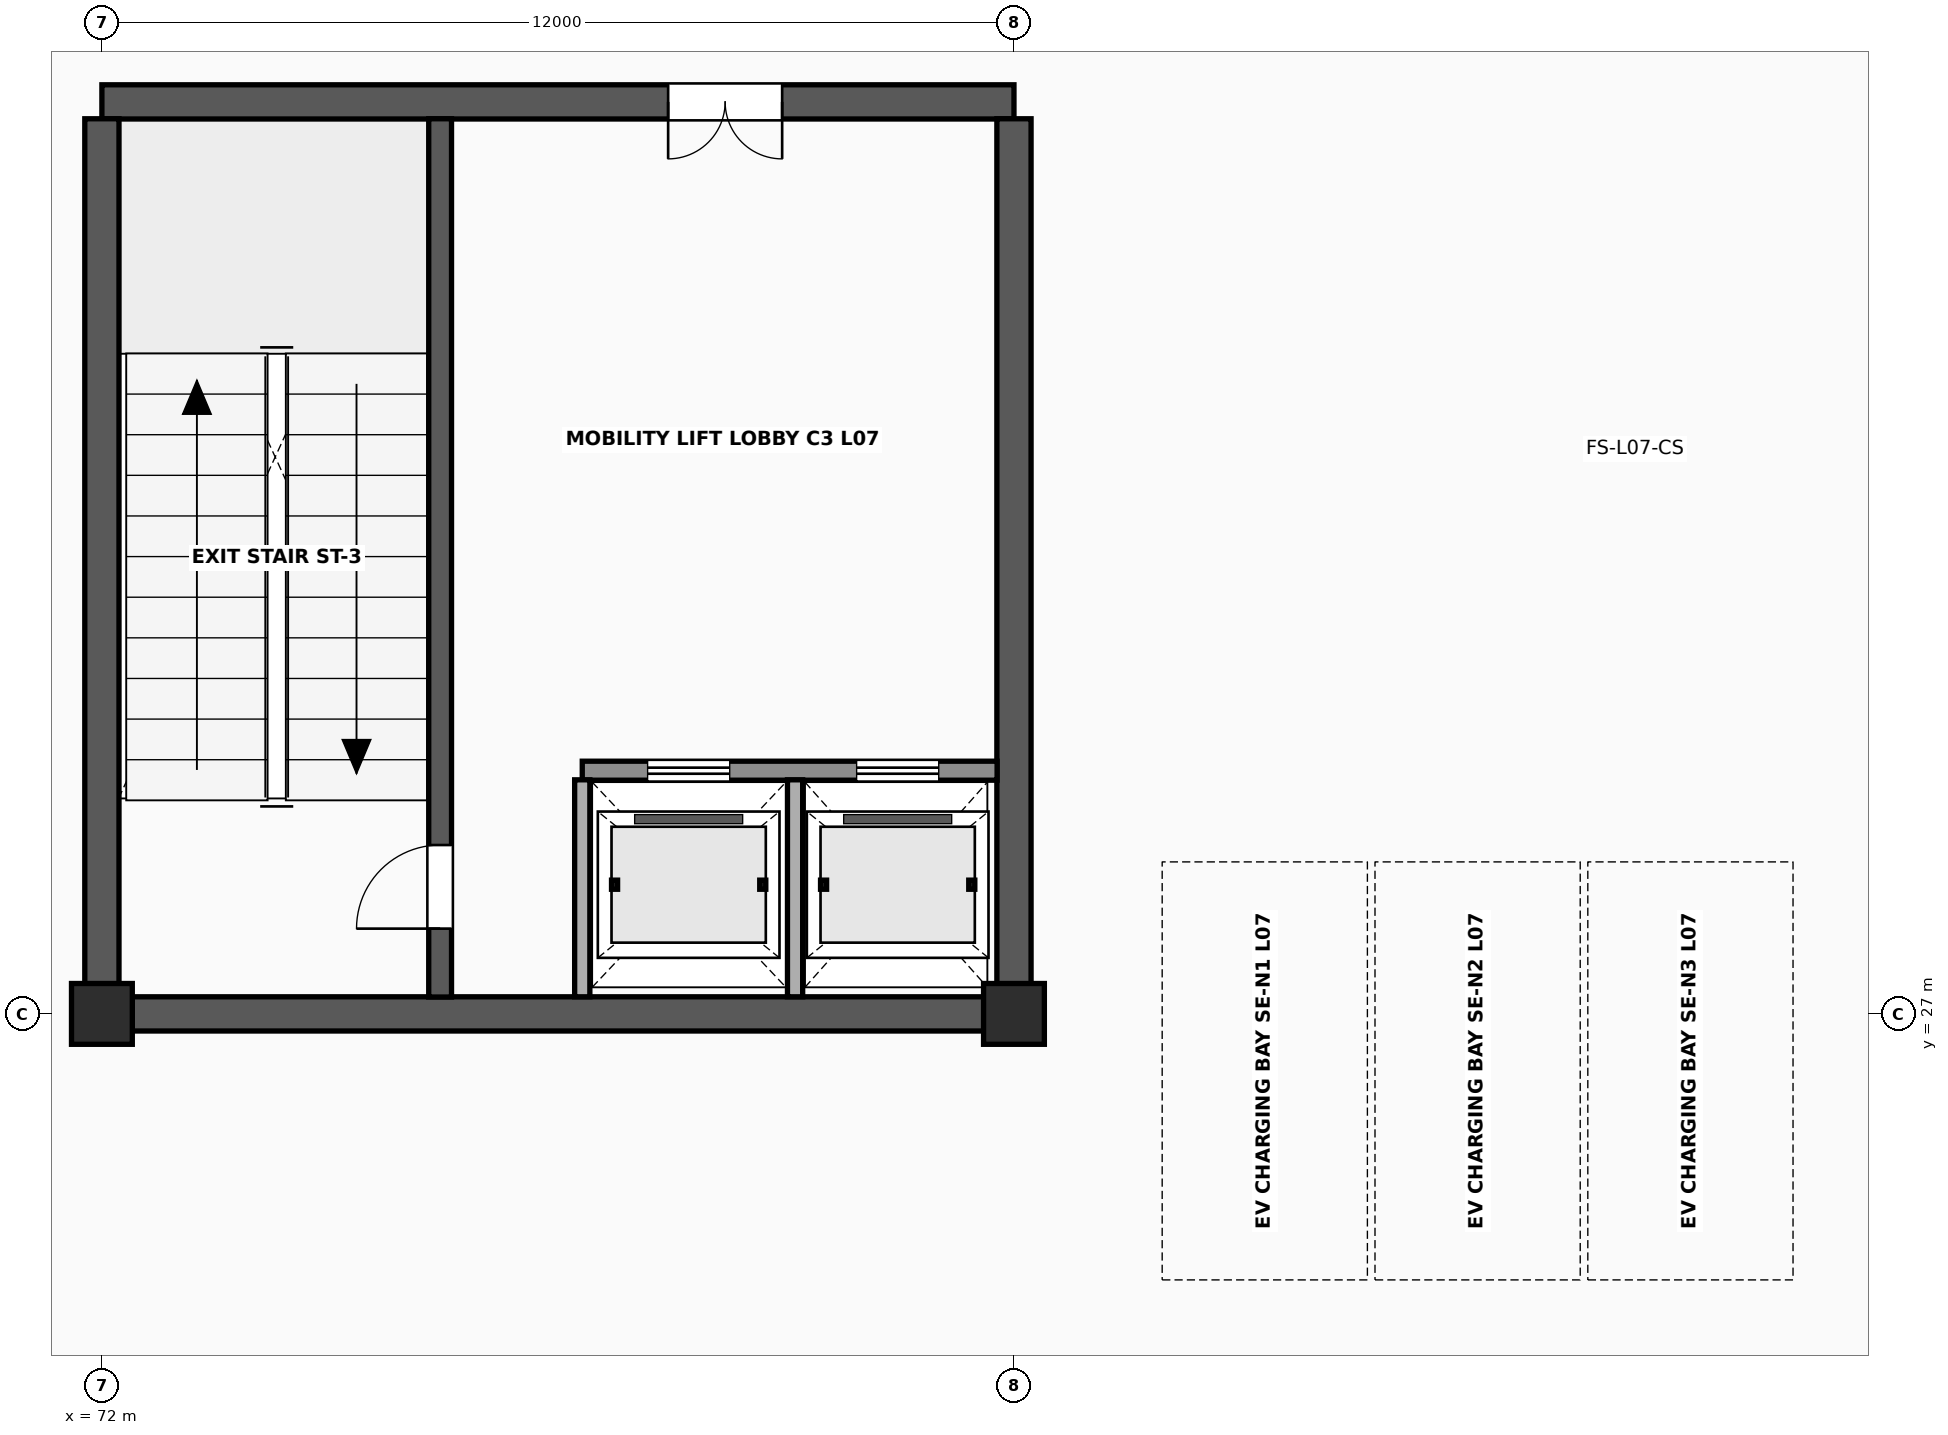
"""IFC4 building model, lengths in metres.
Left out: names, types, materials, properties, quantities, classifications, styles, units other than length and angle.
Written with IfcOpenShell. Run it as: python <this file> out.ifc"""

import sys

from ifc_helpers import new_model, si_unit, direction, frame, frame_2d, origin, origin_2d, place, context, subcontext, project, spatial, rectangle, extrude, element, fill, save


model = new_model("IFC4")
c1 = context("Model", 3, precision=1e-05, world=origin(), true_north=direction((0.0, 1.0)))
c2 = subcontext(c1, "Body", "Model", "MODEL_VIEW")
j1 = project(units=[si_unit("LENGTHUNIT", "METRE"), si_unit("PLANEANGLEUNIT", "RADIAN")], contexts=[c1])
p1 = place(None, origin())
s1 = spatial("IfcSite", under=j1, at=p1, CompositionType="ELEMENT")
p2 = place(p1, origin())
s2 = spatial("IfcBuilding", under=s1, at=p2, CompositionType="ELEMENT")
p3 = place(p2, frame((0.0, 0.0, 28.6)))
s3 = spatial("IfcBuildingStorey", under=s2, at=p3, CompositionType="ELEMENT", Elevation=28.6)
for number, where, z_axis, x_axis in (
    (1, (72.0, 27.0, 0.0), (0.0, 0.0, 1.0), (1.0, 0.0, 0.0)),
    (2, (84.0, 27.0, 0.0), (0.0, 0.0, 1.0), (1.0, 0.0, 0.0)),
):
    element("IfcColumn", number, at=place(p3, frame(where, z_axis=z_axis, x_axis=x_axis)), inside=s3, PredefinedType="COLUMN", context=c2, shape_type="SweptSolid", body=[
        extrude(rectangle(XDim=0.8, YDim=0.8, at=origin_2d()), origin(), (0.0, 0.0, 1.0), 3.8),
    ])
p4 = place(p3, frame((72.397, 27.0, 0.0), z_axis=(0.0, 0.0, 1.0), x_axis=(1.0, 0.0, 0.0)))
e3 = element("IfcWall", 3, at=p4, inside=s3, PredefinedType="SHEAR", context=c2, shape_type="SweptSolid", body=[
    extrude(rectangle(XDim=11.206, YDim=0.45, at=frame_2d((5.603, 0.0))), origin(), (0.0, 0.0, 1.0), 3.553),
])
p5 = place(p3, frame((72.0, 39.0, 0.0), z_axis=(0.0, 0.0, 1.0), x_axis=(1.0, 0.0, 0.0)))
e4 = element("IfcWall", 4, at=p5, inside=s3, PredefinedType="SHEAR", context=c2, shape_type="SweptSolid", body=[
    extrude(rectangle(XDim=12.0, YDim=0.45, at=frame_2d((6.0, 0.0))), origin(), (0.0, 0.0, 1.0), 3.553),
])
p6 = place(p5, frame((7.45, 0.0, 0.0)))
e5 = element("IfcOpeningElement", 5, at=p6, cuts=e4, PredefinedType="OPENING", context=c2, shape_type="SweptSolid", body=[
    extrude(rectangle(XDim=1.5, YDim=2.25, at=frame_2d((0.75, 1.125))), frame((0.0, 0.24, 0.0), z_axis=(0.0, -1.0, 0.0), x_axis=(1.0, 0.0, 0.0)), (0.0, 0.0, 1.0), 0.48),
])
for number, where, z_axis, x_axis in (
    (6, (72.0, 27.397, 0.0), (0.0, 0.0, 1.0), (0.0, 1.0, 0.0)),
    (7, (84.0, 27.397, 0.0), (0.0, 0.0, 1.0), (0.0, 1.0, 0.0)),
):
    element("IfcWall", number, at=place(p3, frame(where, z_axis=z_axis, x_axis=x_axis)), inside=s3, PredefinedType="SHEAR", context=c2, shape_type="SweptSolid", body=[
        extrude(rectangle(XDim=11.381, YDim=0.45, at=frame_2d((5.69, 0.0))), origin(), (0.0, 0.0, 1.0), 3.553),
    ])
p7 = place(p3, frame((76.45, 27.222, 0.0), z_axis=(0.0, 0.0, 1.0), x_axis=(0.0, 1.0, 0.0)))
e8 = element("IfcWall", 8, at=p7, inside=s3, PredefinedType="SHEAR", context=c2, shape_type="SweptSolid", body=[
    extrude(rectangle(XDim=11.556, YDim=0.3, at=frame_2d((5.778, 0.0))), origin(), (0.0, 0.0, 1.0), 3.553),
])
p8 = place(p7, frame((0.9, 0.0, 0.0)))
e9 = element("IfcOpeningElement", 9, at=p8, cuts=e8, PredefinedType="OPENING", context=c2, shape_type="SweptSolid", body=[
    extrude(rectangle(XDim=1.1, YDim=2.2, at=frame_2d((0.55, 1.1))), frame((0.0, 0.165, 0.0), z_axis=(0.0, -1.0, 0.0), x_axis=(1.0, 0.0, 0.0)), (0.0, 0.0, 1.0), 0.33),
])
p9 = place(p3, frame((78.32, 30.2, 0.0), z_axis=(0.0, 0.0, 1.0), x_axis=(1.0, 0.0, 0.0)))
e10 = element("IfcWall", 10, at=p9, inside=s3, PredefinedType="SOLIDWALL", context=c2, shape_type="SweptSolid", body=[
    extrude(rectangle(XDim=5.458, YDim=0.25, at=frame_2d((2.729, 0.0))), origin(), (0.0, 0.0, 1.0), 3.553),
])
p10 = place(p9, frame((0.86, 0.0, 0.0)))
e11 = element("IfcOpeningElement", 11, at=p10, cuts=e10, PredefinedType="OPENING", context=c2, shape_type="SweptSolid", body=[
    extrude(rectangle(XDim=1.08, YDim=2.22, at=frame_2d((0.54, 1.11))), frame((0.0, 0.14, 0.0), z_axis=(0.0, -1.0, 0.0), x_axis=(1.0, 0.0, 0.0)), (0.0, 0.0, 1.0), 0.28),
])
p11 = place(p9, frame((3.61, 0.0, 0.0)))
e12 = element("IfcOpeningElement", 12, at=p11, cuts=e10, PredefinedType="OPENING", context=c2, shape_type="SweptSolid", body=[
    extrude(rectangle(XDim=1.08, YDim=2.22, at=frame_2d((0.54, 1.11))), frame((0.0, 0.14, 0.0), z_axis=(0.0, -1.0, 0.0), x_axis=(1.0, 0.0, 0.0)), (0.0, 0.0, 1.0), 0.28),
])
for number, where, z_axis, x_axis in (
    (13, (78.32, 27.225, 0.0), (0.0, 0.0, 1.0), (0.0, 1.0, 0.0)),
    (14, (81.12, 27.225, 0.0), (0.0, 0.0, 1.0), (0.0, 1.0, 0.0)),
):
    element("IfcWall", number, at=place(p3, frame(where, z_axis=z_axis, x_axis=x_axis)), inside=s3, PredefinedType="SOLIDWALL", context=c2, shape_type="SweptSolid", body=[
        extrude(rectangle(XDim=2.855, YDim=0.2, at=frame_2d((1.427, 0.0))), origin(), (0.0, 0.0, 1.0), 3.543),
    ])
p12 = place(p8, origin())
e15 = element("IfcDoor", 15, at=p12, inside=s3, OperationType="SINGLE_SWING_LEFT", PredefinedType="DOOR", context=c2, shape_type="SweptSolid", body=[
    extrude(rectangle(XDim=1.1, YDim=2.2, at=frame_2d((0.55, 1.1))), frame((0.0, 0.025, 0.0), z_axis=(0.0, -1.0, 0.0), x_axis=(1.0, 0.0, 0.0)), (0.0, 0.0, 1.0), 0.05),
])
fill(e9, e15)
p13 = place(p6, origin())
e16 = element("IfcDoor", 16, at=p13, inside=s3, OperationType="DOUBLE_DOOR_SINGLE_SWING", PredefinedType="DOOR", context=c2, shape_type="SweptSolid", body=[
    extrude(rectangle(XDim=1.5, YDim=2.25, at=frame_2d((0.75, 1.125))), frame((0.0, 0.025, 0.0), z_axis=(0.0, -1.0, 0.0), x_axis=(1.0, 0.0, 0.0)), (0.0, 0.0, 1.0), 0.05),
])
fill(e5, e16)
p14 = place(p10, origin())
e17 = element("IfcDoor", 17, at=p14, inside=s3, OperationType="SLIDING_TO_LEFT", PredefinedType="USERDEFINED", context=c2, shape_type="SweptSolid", body=[
    extrude(rectangle(XDim=1.08, YDim=2.22, at=frame_2d((0.54, 1.11))), frame((0.0, 0.025, 0.0), z_axis=(0.0, -1.0, 0.0), x_axis=(1.0, 0.0, 0.0)), (0.0, 0.0, 1.0), 0.05),
])
fill(e11, e17)
p15 = place(p11, origin())
e18 = element("IfcDoor", 18, at=p15, inside=s3, OperationType="SLIDING_TO_LEFT", PredefinedType="USERDEFINED", context=c2, shape_type="SweptSolid", body=[
    extrude(rectangle(XDim=1.08, YDim=2.22, at=frame_2d((0.54, 1.11))), frame((0.0, 0.025, 0.0), z_axis=(0.0, -1.0, 0.0), x_axis=(1.0, 0.0, 0.0)), (0.0, 0.0, 1.0), 0.05),
])
fill(e12, e18)
save(model, sys.argv[1])
